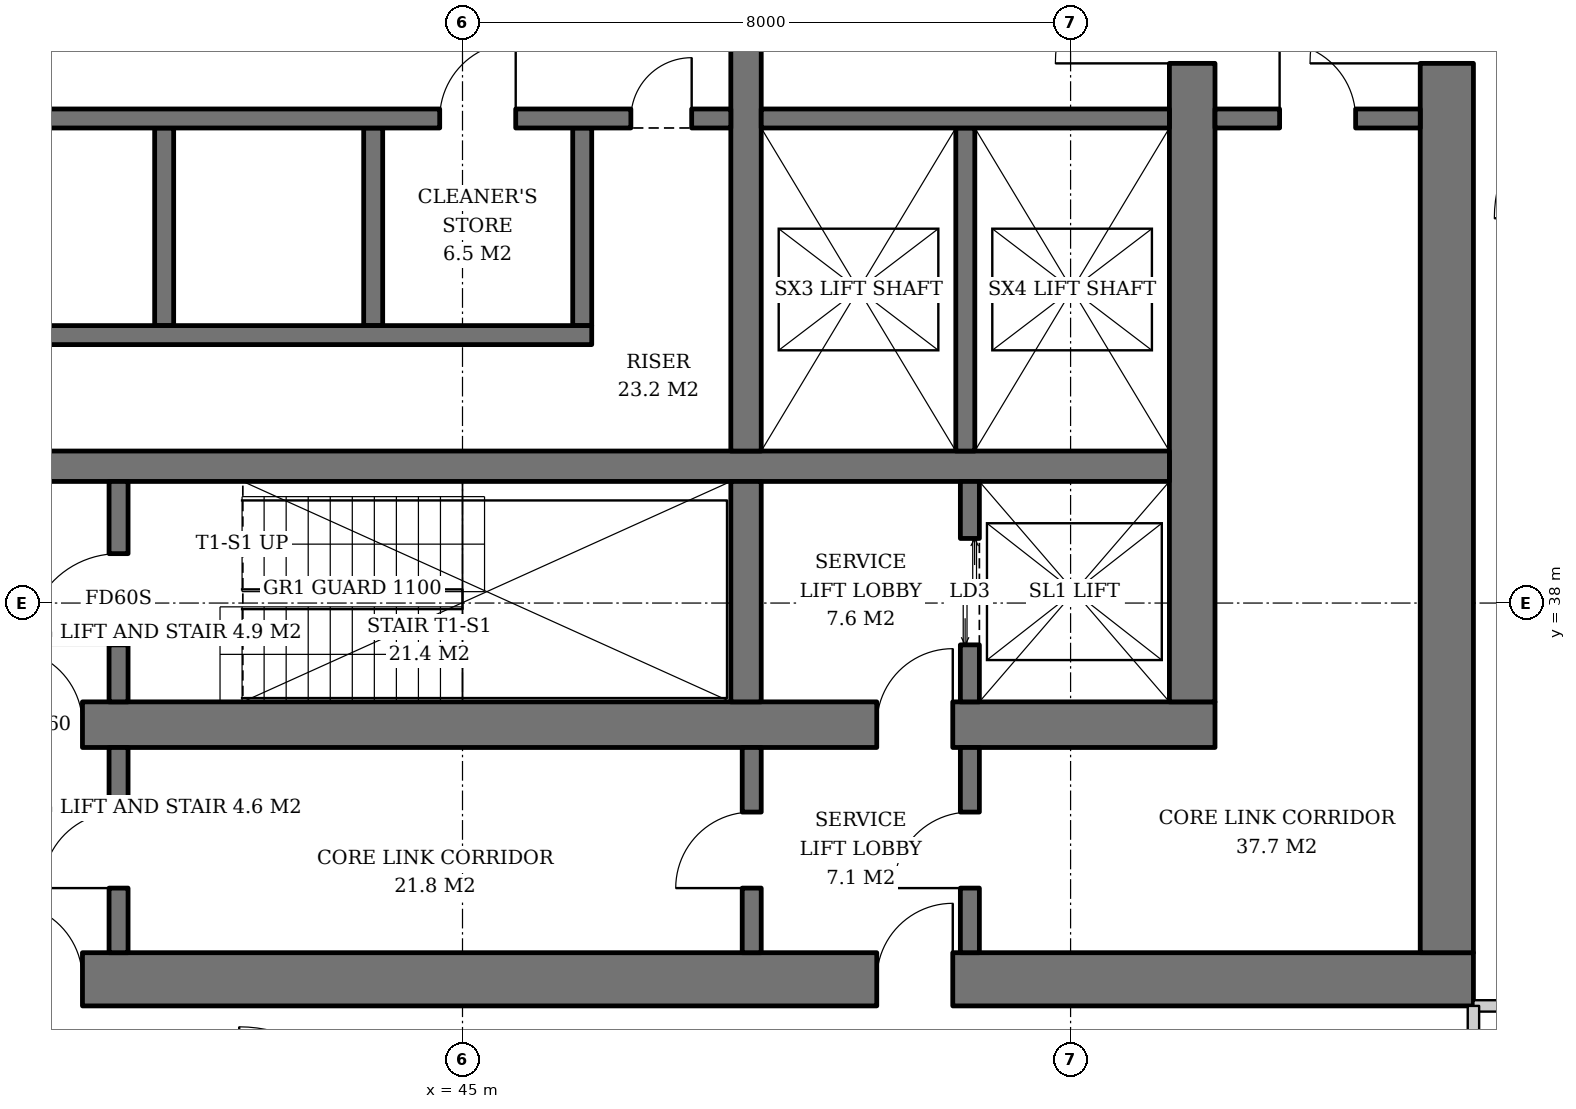
"""IFC4 building model, lengths in metres.
Left out: names, types, materials, properties, quantities, classifications, styles, units other than length and angle.
Written with IfcOpenShell. Run it as: python <this file> out.ifc"""

import sys

from ifc_helpers import new_model, si_unit, direction, frame, frame_2d, origin, origin_2d, place, context, subcontext, project, spatial, rectangle, extrude, element, fill, save


model = new_model("IFC4")
c1 = context("Model", 3, precision=1e-05, world=origin(), true_north=direction((0.0, 1.0)))
c2 = subcontext(c1, "Body", "Model", "MODEL_VIEW")
j1 = project(units=[si_unit("LENGTHUNIT", "METRE"), si_unit("PLANEANGLEUNIT", "RADIAN")], contexts=[c1])
p1 = place(None, origin())
s1 = spatial("IfcSite", under=j1, at=p1, CompositionType="ELEMENT")
p2 = place(p1, origin())
s2 = spatial("IfcBuilding", under=s1, at=p2, CompositionType="ELEMENT")
p3 = place(p2, frame((0.0, 0.0, 161.6)))
s3 = spatial("IfcBuildingStorey", under=s2, at=p3, CompositionType="ELEMENT", Elevation=161.6)
p4 = place(p3, frame((60.407, 30.593, 0.0), z_axis=(-0.031964207655, 0.031964207655, 0.998977766949), x_axis=(-0.707106781187, -0.707106781187, 0.0)))
e1 = element("IfcColumn", 1, at=p4, inside=s3, PredefinedType="COLUMN", context=c2, shape_type="SweptSolid", body=[
    extrude(rectangle(XDim=2.4, YDim=2.4, at=origin_2d()), origin(), (0.0, 0.0, 1.0), 3.804),
])
p5 = place(p3, frame((35.1, 36.4, 0.0), z_axis=(0.0, 0.0, 1.0), x_axis=(1.0, 0.0, 0.0)))
e2 = element("IfcWall", 2, at=p5, inside=s3, PredefinedType="SHEAR", context=c2, shape_type="SweptSolid", body=[
    extrude(rectangle(XDim=19.8, YDim=0.6, at=frame_2d((9.9, 0.0))), origin(), (0.0, 0.0, 1.0), 3.8),
])
p6 = place(p5, frame((3.9, 0.0, 0.0)))
e3 = element("IfcOpeningElement", 3, at=p6, cuts=e2, PredefinedType="OPENING", context=c2, shape_type="SweptSolid", body=[
    extrude(rectangle(XDim=1.0, YDim=2.1, at=frame_2d((0.5, 1.05))), frame((0.0, 0.31, 0.0), z_axis=(0.0, -1.0, 0.0), x_axis=(1.0, 0.0, 0.0)), (0.0, 0.0, 1.0), 0.62),
])
p7 = place(p5, frame((15.35, 0.0, 0.0)))
e4 = element("IfcOpeningElement", 4, at=p7, cuts=e2, PredefinedType="OPENING", context=c2, shape_type="SweptSolid", body=[
    extrude(rectangle(XDim=1.0, YDim=2.1, at=frame_2d((0.5, 1.05))), frame((0.0, 0.31, 0.0), z_axis=(0.0, -1.0, 0.0), x_axis=(1.0, 0.0, 0.0)), (0.0, 0.0, 1.0), 0.62),
])
p8 = place(p3, frame((54.6, 36.7, 0.0), z_axis=(0.0, 0.0, 1.0), x_axis=(0.0, 1.0, 0.0)))
e5 = element("IfcWall", 5, at=p8, inside=s3, PredefinedType="SHEAR", context=c2, shape_type="SweptSolid", body=[
    extrude(rectangle(XDim=18.6, YDim=0.6, at=frame_2d((9.3, 0.0))), origin(), (0.0, 0.0, 1.0), 3.8),
])
p9 = place(p8, frame((8.4, 0.0, 0.0)))
e6 = element("IfcOpeningElement", 6, at=p9, cuts=e5, PredefinedType="OPENING", context=c2, shape_type="SweptSolid", body=[
    extrude(rectangle(XDim=1.8, YDim=2.4, at=frame_2d((0.9, 1.2))), frame((0.0, 0.31, 0.0), z_axis=(0.0, -1.0, 0.0), x_axis=(1.0, 0.0, 0.0)), (0.0, 0.0, 1.0), 0.62),
])
p10 = place(p3, frame((31.7, 33.05, 0.0), z_axis=(0.0, 0.0, 1.0), x_axis=(1.0, 0.0, 0.0)))
e7 = element("IfcWall", 7, at=p10, inside=s3, PredefinedType="SHEAR", context=c2, shape_type="SweptSolid", body=[
    extrude(rectangle(XDim=26.6, YDim=0.7, at=frame_2d((13.3, 0.0))), origin(), (0.0, 0.0, 1.0), 3.8),
])
p11 = place(p10, frame((7.3, 0.0, 0.0)))
e8 = element("IfcOpeningElement", 8, at=p11, cuts=e7, PredefinedType="OPENING", context=c2, shape_type="SweptSolid", body=[
    extrude(rectangle(XDim=1.0, YDim=2.1, at=frame_2d((0.5, 1.05))), frame((0.0, 0.36, 0.0), z_axis=(0.0, -1.0, 0.0), x_axis=(1.0, 0.0, 0.0)), (0.0, 0.0, 1.0), 0.72),
])
p12 = place(p10, frame((18.75, 0.0, 0.0)))
e9 = element("IfcOpeningElement", 9, at=p12, cuts=e7, PredefinedType="OPENING", context=c2, shape_type="SweptSolid", body=[
    extrude(rectangle(XDim=1.0, YDim=2.1, at=frame_2d((0.5, 1.05))), frame((0.0, 0.36, 0.0), z_axis=(0.0, -1.0, 0.0), x_axis=(1.0, 0.0, 0.0)), (0.0, 0.0, 1.0), 0.72),
])
p13 = place(p10, frame((3.2, 0.0, 0.0)))
e10 = element("IfcOpeningElement", 10, at=p13, cuts=e7, PredefinedType="OPENING", context=c2, shape_type="SweptSolid", body=[
    extrude(rectangle(XDim=1.0, YDim=2.1, at=frame_2d((0.5, 1.05))), frame((0.0, 0.36, 0.0), z_axis=(0.0, -1.0, 0.0), x_axis=(1.0, 0.0, 0.0)), (0.0, 0.0, 1.0), 0.72),
])
p14 = place(p3, frame((57.95, 33.4, 0.0), z_axis=(0.0, 0.0, 1.0), x_axis=(0.0, 1.0, 0.0)))
e11 = element("IfcWall", 11, at=p14, inside=s3, PredefinedType="SHEAR", context=c2, shape_type="SweptSolid", body=[
    extrude(rectangle(XDim=25.2, YDim=0.7, at=frame_2d((12.6, 0.0))), origin(), (0.0, 0.0, 1.0), 3.8),
])
p15 = place(p14, frame((11.7, 0.0, 0.0)))
e12 = element("IfcOpeningElement", 12, at=p15, cuts=e11, PredefinedType="OPENING", context=c2, shape_type="SweptSolid", body=[
    extrude(rectangle(XDim=1.8, YDim=2.4, at=frame_2d((0.9, 1.2))), frame((0.0, 0.36, 0.0), z_axis=(0.0, -1.0, 0.0), x_axis=(1.0, 0.0, 0.0)), (0.0, 0.0, 1.0), 0.72),
])
p16 = place(p3, frame((35.7, 39.8, 0.0), z_axis=(0.0, 0.0, 1.0), x_axis=(1.0, 0.0, 0.0)))
e13 = element("IfcWall", 13, at=p16, inside=s3, PredefinedType="SHEAR", context=c2, shape_type="SweptSolid", body=[
    extrude(rectangle(XDim=18.6, YDim=0.4, at=frame_2d((9.3, 0.0))), origin(), (0.0, 0.0, 1.0), 3.8),
])
p17 = place(p3, frame((48.73, 36.7, 0.0), z_axis=(0.0, 0.0, 1.0), x_axis=(0.0, 1.0, 0.0)))
e14 = element("IfcWall", 14, at=p17, inside=s3, PredefinedType="SHEAR", context=c2, shape_type="SweptSolid", body=[
    extrude(rectangle(XDim=2.9, YDim=0.4, at=frame_2d((1.45, 0.0))), origin(), (0.0, 0.0, 1.0), 3.8),
])
p18 = place(p3, frame((48.73, 40.0, 0.0), z_axis=(0.0, 0.0, 1.0), x_axis=(0.0, 1.0, 0.0)))
e15 = element("IfcWall", 15, at=p18, inside=s3, PredefinedType="SHEAR", context=c2, shape_type="SweptSolid", body=[
    extrude(rectangle(XDim=12.0, YDim=0.4, at=frame_2d((6.0, 0.0))), origin(), (0.0, 0.0, 1.0), 3.8),
])
p19 = place(p18, frame((5.5, 0.0, 0.0)))
e16 = element("IfcOpeningElement", 16, at=p19, cuts=e15, PredefinedType="OPENING", context=c2, shape_type="SweptSolid", body=[
    extrude(rectangle(XDim=1.0, YDim=2.1, at=frame_2d((0.5, 1.05))), frame((0.0, 0.21, 0.0), z_axis=(0.0, -1.0, 0.0), x_axis=(1.0, 0.0, 0.0)), (0.0, 0.0, 1.0), 0.42),
])
p20 = place(p3, frame((40.475, 36.7, 0.0), z_axis=(0.0, 0.0, 1.0), x_axis=(0.0, 1.0, 0.0)))
e17 = element("IfcWall", 17, at=p20, inside=s3, PredefinedType="SHEAR", context=c2, shape_type="SweptSolid", body=[
    extrude(rectangle(XDim=2.9, YDim=0.25, at=frame_2d((1.45, 0.0))), origin(), (0.0, 0.0, 1.0), 3.8),
])
p21 = place(p20, frame((0.75, 0.0, 0.0)))
e18 = element("IfcOpeningElement", 18, at=p21, cuts=e17, PredefinedType="OPENING", context=c2, shape_type="SweptSolid", body=[
    extrude(rectangle(XDim=1.2, YDim=2.1, at=frame_2d((0.6, 1.05))), frame((0.0, 0.135, 0.0), z_axis=(0.0, -1.0, 0.0), x_axis=(1.0, 0.0, 0.0)), (0.0, 0.0, 1.0), 0.27),
])
p22 = place(p3, frame((51.675, 36.7, 0.0), z_axis=(0.0, 0.0, 1.0), x_axis=(0.0, 1.0, 0.0)))
e19 = element("IfcWall", 19, at=p22, inside=s3, PredefinedType="SHEAR", context=c2, shape_type="SweptSolid", body=[
    extrude(rectangle(XDim=2.9, YDim=0.25, at=frame_2d((1.45, 0.0))), origin(), (0.0, 0.0, 1.0), 3.8),
])
p23 = place(p22, frame((0.75, 0.0, 0.0)))
e20 = element("IfcOpeningElement", 20, at=p23, cuts=e19, PredefinedType="OPENING", context=c2, shape_type="SweptSolid", body=[
    extrude(rectangle(XDim=1.4, YDim=2.4, at=frame_2d((0.7, 1.2))), frame((0.0, 0.135, 0.0), z_axis=(0.0, -1.0, 0.0), x_axis=(1.0, 0.0, 0.0)), (0.0, 0.0, 1.0), 0.27),
])
for number, where, z_axis, x_axis in (
    (21, (41.075, 44.25, 0.0), (0.0, 0.0, 1.0), (0.0, -1.0, 0.0)),
    (22, (43.825, 44.25, 0.0), (0.0, 0.0, 1.0), (0.0, -1.0, 0.0)),
    (23, (46.575, 44.25, 0.0), (0.0, 0.0, 1.0), (0.0, -1.0, 0.0)),
):
    element("IfcWall", number, at=place(p3, frame(where, z_axis=z_axis, x_axis=x_axis)), inside=s3, PredefinedType="SHEAR", context=c2, shape_type="SweptSolid", body=[
        extrude(rectangle(XDim=2.6, YDim=0.25, at=frame_2d((1.3, 0.0))), origin(), (0.0, 0.0, 1.0), 3.8),
    ])
p24 = place(p3, frame((35.7, 41.525, 0.0), z_axis=(0.0, 0.0, 1.0), x_axis=(1.0, 0.0, 0.0)))
e24 = element("IfcWall", 24, at=p24, inside=s3, PredefinedType="SHEAR", context=c2, shape_type="SweptSolid", body=[
    extrude(rectangle(XDim=11.0, YDim=0.25, at=frame_2d((5.5, 0.0))), origin(), (0.0, 0.0, 1.0), 3.8),
])
p25 = place(p3, frame((35.7, 44.375, 0.0), z_axis=(0.0, 0.0, 1.0), x_axis=(1.0, 0.0, 0.0)))
e25 = element("IfcWall", 25, at=p25, inside=s3, PredefinedType="SHEAR", context=c2, shape_type="SweptSolid", body=[
    extrude(rectangle(XDim=12.83, YDim=0.25, at=frame_2d((6.415, 0.0))), origin(), (0.0, 0.0, 1.0), 3.8),
])
p26 = place(p25, frame((9.0, 0.0, 0.0)))
e26 = element("IfcOpeningElement", 26, at=p26, cuts=e25, PredefinedType="OPENING", context=c2, shape_type="SweptSolid", body=[
    extrude(rectangle(XDim=1.0, YDim=2.1, at=frame_2d((0.5, 1.05))), frame((0.0, 0.135, 0.0), z_axis=(0.0, -1.0, 0.0), x_axis=(1.0, 0.0, 0.0)), (0.0, 0.0, 1.0), 0.27),
])
p27 = place(p25, frame((11.515, 0.0, 0.0)))
e27 = element("IfcOpeningElement", 27, at=p27, cuts=e25, PredefinedType="OPENING", context=c2, shape_type="SweptSolid", body=[
    extrude(rectangle(XDim=0.8, YDim=2.0, at=frame_2d((0.4, 1.0))), frame((0.0, 0.135, 0.0), z_axis=(0.0, -1.0, 0.0), x_axis=(1.0, 0.0, 0.0)), (0.0, 0.0, 1.0), 0.27),
])
p28 = place(p3, frame((51.615, 44.25, 0.0), z_axis=(0.0, 0.0, 1.0), x_axis=(0.0, -1.0, 0.0)))
e28 = element("IfcWall", 28, at=p28, inside=s3, PredefinedType="SHEAR", context=c2, shape_type="SweptSolid", body=[
    extrude(rectangle(XDim=4.25, YDim=0.25, at=frame_2d((2.125, 0.0))), origin(), (0.0, 0.0, 1.0), 3.8),
])
p29 = place(p3, frame((48.93, 44.375, 0.0), z_axis=(0.0, 0.0, 1.0), x_axis=(1.0, 0.0, 0.0)))
e29 = element("IfcWall", 29, at=p29, inside=s3, PredefinedType="SHEAR", context=c2, shape_type="SweptSolid", body=[
    extrude(rectangle(XDim=5.37, YDim=0.25, at=frame_2d((2.685, 0.0))), origin(), (0.0, 0.0, 1.0), 3.8),
])
p30 = place(p3, frame((40.475, 33.4, 0.0), z_axis=(0.0, 0.0, 1.0), x_axis=(0.0, 1.0, 0.0)))
e30 = element("IfcWall", 30, at=p30, inside=s3, PredefinedType="SOLIDWALL", context=c2, shape_type="SweptSolid", body=[
    extrude(rectangle(XDim=2.7, YDim=0.25, at=frame_2d((1.35, 0.0))), origin(), (0.0, 0.0, 1.0), 3.2),
])
p31 = place(p30, frame((0.85, 0.0, 0.0)))
e31 = element("IfcOpeningElement", 31, at=p31, cuts=e30, PredefinedType="OPENING", context=c2, shape_type="SweptSolid", body=[
    extrude(rectangle(XDim=1.0, YDim=2.1, at=frame_2d((0.5, 1.05))), frame((0.0, 0.135, 0.0), z_axis=(0.0, -1.0, 0.0), x_axis=(1.0, 0.0, 0.0)), (0.0, 0.0, 1.0), 0.27),
])
p32 = place(p3, frame((54.9, 44.375, 0.0), z_axis=(0.0, 0.0, 1.0), x_axis=(1.0, 0.0, 0.0)))
e32 = element("IfcWall", 32, at=p32, inside=s3, PredefinedType="SOLIDWALL", context=c2, shape_type="SweptSolid", body=[
    extrude(rectangle(XDim=2.7, YDim=0.25, at=frame_2d((1.35, 0.0))), origin(), (0.0, 0.0, 1.0), 3.2),
])
p33 = place(p32, frame((0.85, 0.0, 0.0)))
e33 = element("IfcOpeningElement", 33, at=p33, cuts=e32, PredefinedType="OPENING", context=c2, shape_type="SweptSolid", body=[
    extrude(rectangle(XDim=1.0, YDim=2.1, at=frame_2d((0.5, 1.05))), frame((0.0, 0.135, 0.0), z_axis=(0.0, -1.0, 0.0), x_axis=(1.0, 0.0, 0.0)), (0.0, 0.0, 1.0), 0.27),
])
p34 = place(p3, frame((48.805, 33.4, 0.0), z_axis=(0.0, 0.0, 1.0), x_axis=(0.0, 1.0, 0.0)))
e34 = element("IfcWall", 34, at=p34, inside=s3, PredefinedType="SOLIDWALL", context=c2, shape_type="SweptSolid", body=[
    extrude(rectangle(XDim=2.7, YDim=0.25, at=frame_2d((1.35, 0.0))), origin(), (0.0, 0.0, 1.0), 3.2),
])
p35 = place(p34, frame((0.85, 0.0, 0.0)))
e35 = element("IfcOpeningElement", 35, at=p35, cuts=e34, PredefinedType="OPENING", context=c2, shape_type="SweptSolid", body=[
    extrude(rectangle(XDim=1.0, YDim=2.1, at=frame_2d((0.5, 1.05))), frame((0.0, 0.135, 0.0), z_axis=(0.0, -1.0, 0.0), x_axis=(1.0, 0.0, 0.0)), (0.0, 0.0, 1.0), 0.27),
])
p36 = place(p3, frame((51.675, 33.4, 0.0), z_axis=(0.0, 0.0, 1.0), x_axis=(0.0, 1.0, 0.0)))
e36 = element("IfcWall", 36, at=p36, inside=s3, PredefinedType="SOLIDWALL", context=c2, shape_type="SweptSolid", body=[
    extrude(rectangle(XDim=2.7, YDim=0.25, at=frame_2d((1.35, 0.0))), origin(), (0.0, 0.0, 1.0), 3.2),
])
p37 = place(p36, frame((0.85, 0.0, 0.0)))
e37 = element("IfcOpeningElement", 37, at=p37, cuts=e36, PredefinedType="OPENING", context=c2, shape_type="SweptSolid", body=[
    extrude(rectangle(XDim=1.0, YDim=2.1, at=frame_2d((0.5, 1.05))), frame((0.0, 0.135, 0.0), z_axis=(0.0, -1.0, 0.0), x_axis=(1.0, 0.0, 0.0)), (0.0, 0.0, 1.0), 0.27),
])
for number, where, z_axis, x_axis in (
    (38, (58.3, 32.7, 0.0), (0.0, 0.0, 1.0), (1.0, 0.0, 0.0)),
    (39, (58.3, 32.7, 0.0), (0.0, 0.0, 1.0), (0.0, -1.0, 0.0)),
):
    element("IfcWall", number, at=place(p3, frame(where, z_axis=z_axis, x_axis=x_axis)), inside=s3, PredefinedType="PARTITIONING", context=c2, shape_type="SweptSolid", body=[
        extrude(rectangle(XDim=1.829, YDim=0.15, at=frame_2d((0.915, 0.0))), origin(), (0.0, 0.0, 1.0), 3.6),
    ])
p38 = place(p21, origin())
e40 = element("IfcDoor", 40, at=p38, inside=s3, OperationType="SINGLE_SWING_LEFT", PredefinedType="DOOR", context=c2, shape_type="SweptSolid", body=[
    extrude(rectangle(XDim=1.2, YDim=2.1, at=frame_2d((0.6, 1.05))), frame((0.0, 0.025, 0.0), z_axis=(0.0, -1.0, 0.0), x_axis=(1.0, 0.0, 0.0)), (0.0, 0.0, 1.0), 0.05),
])
fill(e18, e40)
p39 = place(p23, origin())
e41 = element("IfcDoor", 41, at=p39, inside=s3, OperationType="DOUBLE_DOOR_SLIDING", PredefinedType="DOOR", context=c2, shape_type="SweptSolid", body=[
    extrude(rectangle(XDim=1.4, YDim=2.4, at=frame_2d((0.7, 1.2))), frame((0.0, 0.025, 0.0), z_axis=(0.0, -1.0, 0.0), x_axis=(1.0, 0.0, 0.0)), (0.0, 0.0, 1.0), 0.05),
])
fill(e20, e41)
p40 = place(p26, origin())
e42 = element("IfcDoor", 42, at=p40, inside=s3, OperationType="SINGLE_SWING_RIGHT", PredefinedType="DOOR", context=c2, shape_type="SweptSolid", body=[
    extrude(rectangle(XDim=1.0, YDim=2.1, at=frame_2d((0.5, 1.05))), frame((0.0, 0.025, 0.0), z_axis=(0.0, -1.0, 0.0), x_axis=(1.0, 0.0, 0.0)), (0.0, 0.0, 1.0), 0.05),
])
fill(e26, e42)
p41 = place(p27, origin())
e43 = element("IfcDoor", 43, at=p41, inside=s3, OperationType="SINGLE_SWING_RIGHT", PredefinedType="DOOR", context=c2, shape_type="SweptSolid", body=[
    extrude(rectangle(XDim=0.8, YDim=2.0, at=frame_2d((0.4, 1.0))), frame((0.0, 0.025, 0.0), z_axis=(0.0, -1.0, 0.0), x_axis=(1.0, 0.0, 0.0)), (0.0, 0.0, 1.0), 0.05),
])
fill(e27, e43)
p42 = place(p31, origin())
e44 = element("IfcDoor", 44, at=p42, inside=s3, OperationType="SINGLE_SWING_LEFT", PredefinedType="DOOR", context=c2, shape_type="SweptSolid", body=[
    extrude(rectangle(XDim=1.0, YDim=2.1, at=frame_2d((0.5, 1.05))), frame((0.0, 0.025, 0.0), z_axis=(0.0, -1.0, 0.0), x_axis=(1.0, 0.0, 0.0)), (0.0, 0.0, 1.0), 0.05),
])
fill(e31, e44)
p43 = place(p33, origin())
e45 = element("IfcDoor", 45, at=p43, inside=s3, OperationType="SINGLE_SWING_LEFT", PredefinedType="DOOR", context=c2, shape_type="SweptSolid", body=[
    extrude(rectangle(XDim=1.0, YDim=2.1, at=frame_2d((0.5, 1.05))), frame((0.0, 0.025, 0.0), z_axis=(0.0, -1.0, 0.0), x_axis=(1.0, 0.0, 0.0)), (0.0, 0.0, 1.0), 0.05),
])
fill(e33, e45)
p44 = place(p35, origin())
e46 = element("IfcDoor", 46, at=p44, inside=s3, OperationType="SINGLE_SWING_LEFT", PredefinedType="DOOR", context=c2, shape_type="SweptSolid", body=[
    extrude(rectangle(XDim=1.0, YDim=2.1, at=frame_2d((0.5, 1.05))), frame((0.0, 0.025, 0.0), z_axis=(0.0, -1.0, 0.0), x_axis=(1.0, 0.0, 0.0)), (0.0, 0.0, 1.0), 0.05),
])
fill(e35, e46)
p45 = place(p37, origin())
e47 = element("IfcDoor", 47, at=p45, inside=s3, OperationType="SINGLE_SWING_LEFT", PredefinedType="DOOR", context=c2, shape_type="SweptSolid", body=[
    extrude(rectangle(XDim=1.0, YDim=2.1, at=frame_2d((0.5, 1.05))), frame((0.0, 0.025, 0.0), z_axis=(0.0, -1.0, 0.0), x_axis=(1.0, 0.0, 0.0)), (0.0, 0.0, 1.0), 0.05),
])
fill(e37, e47)
p46 = place(p6, origin())
e48 = element("IfcDoor", 48, at=p46, inside=s3, OperationType="SINGLE_SWING_LEFT", PredefinedType="DOOR", context=c2, shape_type="SweptSolid", body=[
    extrude(rectangle(XDim=1.0, YDim=2.1, at=frame_2d((0.5, 1.05))), frame((0.0, 0.025, 0.0), z_axis=(0.0, -1.0, 0.0), x_axis=(1.0, 0.0, 0.0)), (0.0, 0.0, 1.0), 0.05),
])
fill(e3, e48)
p47 = place(p9, origin())
e49 = element("IfcDoor", 49, at=p47, inside=s3, OperationType="DOUBLE_DOOR_SINGLE_SWING", PredefinedType="DOOR", context=c2, shape_type="SweptSolid", body=[
    extrude(rectangle(XDim=1.8, YDim=2.4, at=frame_2d((0.9, 1.2))), frame((0.0, 0.025, 0.0), z_axis=(0.0, -1.0, 0.0), x_axis=(1.0, 0.0, 0.0)), (0.0, 0.0, 1.0), 0.05),
])
fill(e6, e49)
p48 = place(p7, origin())
e50 = element("IfcDoor", 50, at=p48, inside=s3, OperationType="SINGLE_SWING_RIGHT", PredefinedType="DOOR", context=c2, shape_type="SweptSolid", body=[
    extrude(rectangle(XDim=1.0, YDim=2.1, at=frame_2d((0.5, 1.05))), frame((0.0, 0.025, 0.0), z_axis=(0.0, -1.0, 0.0), x_axis=(1.0, 0.0, 0.0)), (0.0, 0.0, 1.0), 0.05),
])
fill(e4, e50)
p49 = place(p15, origin())
e51 = element("IfcDoor", 51, at=p49, inside=s3, OperationType="DOUBLE_DOOR_SINGLE_SWING", PredefinedType="DOOR", context=c2, shape_type="SweptSolid", body=[
    extrude(rectangle(XDim=1.8, YDim=2.4, at=frame_2d((0.9, 1.2))), frame((0.0, 0.025, 0.0), z_axis=(0.0, -1.0, 0.0), x_axis=(1.0, 0.0, 0.0)), (0.0, 0.0, 1.0), 0.05),
])
fill(e12, e51)
p50 = place(p11, origin())
e52 = element("IfcDoor", 52, at=p50, inside=s3, OperationType="SINGLE_SWING_LEFT", PredefinedType="DOOR", context=c2, shape_type="SweptSolid", body=[
    extrude(rectangle(XDim=1.0, YDim=2.1, at=frame_2d((0.5, 1.05))), frame((0.0, 0.025, 0.0), z_axis=(0.0, -1.0, 0.0), x_axis=(1.0, 0.0, 0.0)), (0.0, 0.0, 1.0), 0.05),
])
fill(e8, e52)
p51 = place(p12, origin())
e53 = element("IfcDoor", 53, at=p51, inside=s3, OperationType="SINGLE_SWING_RIGHT", PredefinedType="DOOR", context=c2, shape_type="SweptSolid", body=[
    extrude(rectangle(XDim=1.0, YDim=2.1, at=frame_2d((0.5, 1.05))), frame((0.0, 0.025, 0.0), z_axis=(0.0, -1.0, 0.0), x_axis=(1.0, 0.0, 0.0)), (0.0, 0.0, 1.0), 0.05),
])
fill(e9, e53)
save(model, sys.argv[1])
